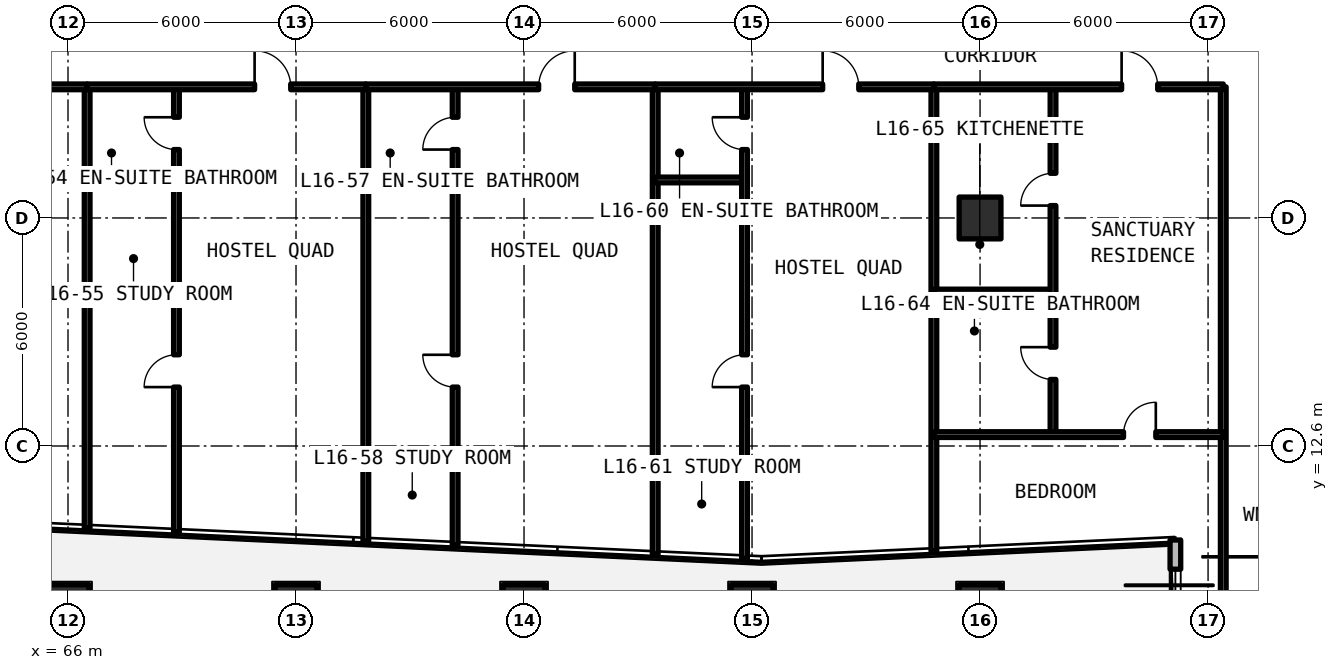
"""IFC4 building model, lengths in metres.
Left out: names, types, materials, properties, quantities, classifications, styles, units other than length and angle.
Written with IfcOpenShell. Run it as: python <this file> out.ifc"""

import sys

from ifc_helpers import new_model, si_unit, direction, frame, frame_2d, origin, origin_2d, place, context, subcontext, project, spatial, rectangle, extrude, element, fill, save


model = new_model("IFC4")
c1 = context("Model", 3, precision=1e-05, world=origin(), true_north=direction((0.0, 1.0)))
c2 = subcontext(c1, "Body", "Model", "MODEL_VIEW")
j1 = project(units=[si_unit("LENGTHUNIT", "METRE"), si_unit("PLANEANGLEUNIT", "RADIAN")], contexts=[c1])
p1 = place(None, origin())
s1 = spatial("IfcSite", under=j1, at=p1, CompositionType="ELEMENT")
p2 = place(p1, origin())
s2 = spatial("IfcBuilding", under=s1, at=p2, CompositionType="ELEMENT")
p3 = place(p2, frame((0.0, 0.0, 58.74)))
s3 = spatial("IfcBuildingStorey", under=s2, at=p3, CompositionType="ELEMENT", Elevation=58.74)
for number, where, z_axis, x_axis in (
    (1, (90.0, 18.6, 0.0), (0.0, 0.0, 1.0), (1.0, 0.0, 0.0)),
    (2, (66.0, 8.4, 0.0), (0.0, 0.0, 1.0), (1.0, 0.0, 0.0)),
    (3, (72.0, 8.4, 0.0), (0.0, 0.0, 1.0), (1.0, 0.0, 0.0)),
    (4, (78.0, 8.4, 0.0), (0.0, 0.0, 1.0), (1.0, 0.0, 0.0)),
    (5, (84.0, 8.4, 0.0), (0.0, 0.0, 1.0), (1.0, 0.0, 0.0)),
    (6, (90.0, 8.4, 0.0), (0.0, 0.0, 1.0), (1.0, 0.0, 0.0)),
):
    element("IfcColumn", number, at=place(p3, frame(where, z_axis=z_axis, x_axis=x_axis)), inside=s3, PredefinedType="COLUMN", context=c2, shape_type="SweptSolid", body=[
        extrude(rectangle(XDim=1.1, YDim=1.1, at=origin_2d()), origin(), (0.0, 0.0, 1.0), 3.63),
    ])
p4 = place(p3, frame((95.14, 10.127, 0.0), z_axis=(0.0, 0.0, 1.0), x_axis=(0.0, -1.0, 0.0)))
e7 = element("IfcWall", 7, at=p4, inside=s3, PredefinedType="SOLIDWALL", context=c2, shape_type="SweptSolid", body=[
    extrude(rectangle(XDim=2.387, YDim=0.28, at=frame_2d((1.193, 0.0))), origin(), (0.0, 0.0, 1.0), 3.41),
])
p5 = place(p4, frame((0.768, 0.0, 0.78)))
e8 = element("IfcOpeningElement", 8, at=p5, cuts=e7, PredefinedType="OPENING", context=c2, shape_type="SweptSolid", body=[
    extrude(rectangle(XDim=0.85, YDim=1.65, at=frame_2d((0.425, 0.825))), frame((0.0, 0.15, 0.0), z_axis=(0.0, -1.0, 0.0), x_axis=(1.0, 0.0, 0.0)), (0.0, 0.0, 1.0), 0.3),
])
p6 = place(p3, frame((96.542, 7.74, 0.0), z_axis=(0.0, 0.0, 1.0), x_axis=(0.707106781187, 0.707106781187, 0.0)))
e9 = element("IfcWall", 9, at=p6, inside=s3, PredefinedType="SOLIDWALL", context=c2, shape_type="SweptSolid", body=[
    extrude(rectangle(XDim=5.824, YDim=0.28, at=frame_2d((2.912, 0.0))), origin(), (0.0, 0.0, 1.0), 3.41),
])
p7 = place(p6, frame((1.212, 0.0, 0.78)))
e10 = element("IfcOpeningElement", 10, at=p7, cuts=e9, PredefinedType="OPENING", context=c2, shape_type="SweptSolid", body=[
    extrude(rectangle(XDim=3.4, YDim=1.66, at=frame_2d((1.7, 0.83))), frame((0.0, 0.15, 0.0), z_axis=(0.0, -1.0, 0.0), x_axis=(1.0, 0.0, 0.0)), (0.0, 0.0, 1.0), 0.3),
])
p8 = place(p3, frame((96.4, 7.74, 0.0), z_axis=(0.0, 0.0, 1.0), x_axis=(0.0, 1.0, 0.0)))
e11 = element("IfcWall", 11, at=p8, inside=s3, PredefinedType="SOLIDWALL", context=c2, shape_type="SweptSolid", body=[
    extrude(rectangle(XDim=14.31, YDim=0.15, at=frame_2d((7.155, 0.0))), origin(), (0.0, 0.0, 1.0), 2.63),
])
p9 = place(p3, frame((66.504, 10.446, 0.0), z_axis=(0.0, 0.0, 1.0), x_axis=(0.0, 1.0, 0.0)))
e12 = element("IfcWall", 12, at=p9, inside=s3, PredefinedType="SOLIDWALL", context=c2, shape_type="SweptSolid", body=[
    extrude(rectangle(XDim=11.604, YDim=0.15, at=frame_2d((5.802, 0.0))), origin(), (0.0, 0.0, 1.0), 2.63),
])
p10 = place(p3, frame((58.889, 22.05, 0.0), z_axis=(0.0, 0.0, 1.0), x_axis=(1.0, 0.0, 0.0)))
e13 = element("IfcWall", 13, at=p10, inside=s3, PredefinedType="SOLIDWALL", context=c2, shape_type="SweptSolid", body=[
    extrude(rectangle(XDim=7.615, YDim=0.15, at=frame_2d((3.808, 0.0))), origin(), (0.0, 0.0, 1.0), 2.63),
])
p11 = place(p10, frame((4.548, 0.0, 0.0)))
e14 = element("IfcOpeningElement", 14, at=p11, cuts=e13, PredefinedType="OPENING", context=c2, shape_type="SweptSolid", body=[
    extrude(rectangle(XDim=0.95, YDim=2.15, at=frame_2d((0.475, 1.075))), frame((0.0, 0.085, 0.0), z_axis=(0.0, -1.0, 0.0), x_axis=(1.0, 0.0, 0.0)), (0.0, 0.0, 1.0), 0.17),
])
p12 = place(p3, frame((73.837, 10.104, 0.0), z_axis=(0.0, 0.0, 1.0), x_axis=(0.0, 1.0, 0.0)))
e15 = element("IfcWall", 15, at=p12, inside=s3, PredefinedType="SOLIDWALL", context=c2, shape_type="SweptSolid", body=[
    extrude(rectangle(XDim=11.946, YDim=0.15, at=frame_2d((5.973, 0.0))), origin(), (0.0, 0.0, 1.0), 2.63),
])
p13 = place(p3, frame((66.504, 19.6, 0.0), z_axis=(0.0, 0.0, 1.0), x_axis=(1.0, 0.0, 0.0)))
e16 = element("IfcWall", 16, at=p13, inside=s3, PredefinedType="PARTITIONING", context=c2, shape_type="SweptSolid", body=[
    extrude(rectangle(XDim=2.35, YDim=0.15, at=frame_2d((1.175, 0.0))), origin(), (0.0, 0.0, 1.0), 2.63),
])
p14 = place(p3, frame((68.854, 10.336, 0.0), z_axis=(0.0, 0.0, 1.0), x_axis=(0.0, 1.0, 0.0)))
e17 = element("IfcWall", 17, at=p14, inside=s3, PredefinedType="PARTITIONING", context=c2, shape_type="SweptSolid", body=[
    extrude(rectangle(XDim=11.714, YDim=0.15, at=frame_2d((5.857, 0.0))), origin(), (0.0, 0.0, 1.0), 2.63),
])
p15 = place(p14, frame((3.814, 0.0, 0.0)))
e18 = element("IfcOpeningElement", 18, at=p15, cuts=e17, PredefinedType="OPENING", context=c2, shape_type="SweptSolid", body=[
    extrude(rectangle(XDim=0.85, YDim=2.1, at=frame_2d((0.425, 1.05))), frame((0.0, 0.085, 0.0), z_axis=(0.0, -1.0, 0.0), x_axis=(1.0, 0.0, 0.0)), (0.0, 0.0, 1.0), 0.17),
])
p16 = place(p14, frame((10.064, 0.0, 0.0)))
e19 = element("IfcOpeningElement", 19, at=p16, cuts=e17, PredefinedType="OPENING", context=c2, shape_type="SweptSolid", body=[
    extrude(rectangle(XDim=0.85, YDim=2.1, at=frame_2d((0.425, 1.05))), frame((0.0, 0.085, 0.0), z_axis=(0.0, -1.0, 0.0), x_axis=(1.0, 0.0, 0.0)), (0.0, 0.0, 1.0), 0.17),
])
p17 = place(p3, frame((66.504, 22.05, 0.0), z_axis=(0.0, 0.0, 1.0), x_axis=(1.0, 0.0, 0.0)))
e20 = element("IfcWall", 20, at=p17, inside=s3, PredefinedType="SOLIDWALL", context=c2, shape_type="SweptSolid", body=[
    extrude(rectangle(XDim=7.333, YDim=0.15, at=frame_2d((3.667, 0.0))), origin(), (0.0, 0.0, 1.0), 2.63),
])
p18 = place(p17, frame((4.406, 0.0, 0.0)))
e21 = element("IfcOpeningElement", 21, at=p18, cuts=e20, PredefinedType="OPENING", context=c2, shape_type="SweptSolid", body=[
    extrude(rectangle(XDim=0.95, YDim=2.15, at=frame_2d((0.475, 1.075))), frame((0.0, 0.085, 0.0), z_axis=(0.0, -1.0, 0.0), x_axis=(1.0, 0.0, 0.0)), (0.0, 0.0, 1.0), 0.17),
])
p19 = place(p3, frame((81.452, 9.75, 0.0), z_axis=(0.0, 0.0, 1.0), x_axis=(0.0, 1.0, 0.0)))
e22 = element("IfcWall", 22, at=p19, inside=s3, PredefinedType="SOLIDWALL", context=c2, shape_type="SweptSolid", body=[
    extrude(rectangle(XDim=12.3, YDim=0.15, at=frame_2d((6.15, 0.0))), origin(), (0.0, 0.0, 1.0), 2.63),
])
p20 = place(p3, frame((73.837, 19.6, 0.0), z_axis=(0.0, 0.0, 1.0), x_axis=(1.0, 0.0, 0.0)))
e23 = element("IfcWall", 23, at=p20, inside=s3, PredefinedType="PARTITIONING", context=c2, shape_type="SweptSolid", body=[
    extrude(rectangle(XDim=2.35, YDim=0.15, at=frame_2d((1.175, 0.0))), origin(), (0.0, 0.0, 1.0), 2.63),
])
p21 = place(p3, frame((76.187, 9.995, 0.0), z_axis=(0.0, 0.0, 1.0), x_axis=(0.0, 1.0, 0.0)))
e24 = element("IfcWall", 24, at=p21, inside=s3, PredefinedType="PARTITIONING", context=c2, shape_type="SweptSolid", body=[
    extrude(rectangle(XDim=12.055, YDim=0.15, at=frame_2d((6.027, 0.0))), origin(), (0.0, 0.0, 1.0), 2.63),
])
p22 = place(p21, frame((4.155, 0.0, 0.0)))
e25 = element("IfcOpeningElement", 25, at=p22, cuts=e24, PredefinedType="OPENING", context=c2, shape_type="SweptSolid", body=[
    extrude(rectangle(XDim=0.85, YDim=2.1, at=frame_2d((0.425, 1.05))), frame((0.0, 0.085, 0.0), z_axis=(0.0, -1.0, 0.0), x_axis=(1.0, 0.0, 0.0)), (0.0, 0.0, 1.0), 0.17),
])
p23 = place(p21, frame((10.405, 0.0, 0.0)))
e26 = element("IfcOpeningElement", 26, at=p23, cuts=e24, PredefinedType="OPENING", context=c2, shape_type="SweptSolid", body=[
    extrude(rectangle(XDim=0.85, YDim=2.1, at=frame_2d((0.425, 1.05))), frame((0.0, 0.085, 0.0), z_axis=(0.0, -1.0, 0.0), x_axis=(1.0, 0.0, 0.0)), (0.0, 0.0, 1.0), 0.17),
])
p24 = place(p3, frame((73.837, 22.05, 0.0), z_axis=(0.0, 0.0, 1.0), x_axis=(1.0, 0.0, 0.0)))
e27 = element("IfcWall", 27, at=p24, inside=s3, PredefinedType="SOLIDWALL", context=c2, shape_type="SweptSolid", body=[
    extrude(rectangle(XDim=7.615, YDim=0.15, at=frame_2d((3.808, 0.0))), origin(), (0.0, 0.0, 1.0), 2.63),
])
p25 = place(p24, frame((4.548, 0.0, 0.0)))
e28 = element("IfcOpeningElement", 28, at=p25, cuts=e27, PredefinedType="OPENING", context=c2, shape_type="SweptSolid", body=[
    extrude(rectangle(XDim=0.95, YDim=2.15, at=frame_2d((0.475, 1.075))), frame((0.0, 0.085, 0.0), z_axis=(0.0, -1.0, 0.0), x_axis=(1.0, 0.0, 0.0)), (0.0, 0.0, 1.0), 0.17),
])
p26 = place(p3, frame((88.785, 9.831, 0.0), z_axis=(0.0, 0.0, 1.0), x_axis=(0.0, 1.0, 0.0)))
e29 = element("IfcWall", 29, at=p26, inside=s3, PredefinedType="SOLIDWALL", context=c2, shape_type="SweptSolid", body=[
    extrude(rectangle(XDim=12.219, YDim=0.15, at=frame_2d((6.109, 0.0))), origin(), (0.0, 0.0, 1.0), 2.63),
])
p27 = place(p3, frame((81.452, 19.6, 0.0), z_axis=(0.0, 0.0, 1.0), x_axis=(1.0, 0.0, 0.0)))
e30 = element("IfcWall", 30, at=p27, inside=s3, PredefinedType="PARTITIONING", context=c2, shape_type="SweptSolid", body=[
    extrude(rectangle(XDim=2.35, YDim=0.15, at=frame_2d((1.175, 0.0))), origin(), (0.0, 0.0, 1.0), 2.63),
])
p28 = place(p3, frame((83.802, 9.641, 0.0), z_axis=(0.0, 0.0, 1.0), x_axis=(0.0, 1.0, 0.0)))
e31 = element("IfcWall", 31, at=p28, inside=s3, PredefinedType="PARTITIONING", context=c2, shape_type="SweptSolid", body=[
    extrude(rectangle(XDim=12.409, YDim=0.15, at=frame_2d((6.205, 0.0))), origin(), (0.0, 0.0, 1.0), 2.63),
])
p29 = place(p28, frame((4.509, 0.0, 0.0)))
e32 = element("IfcOpeningElement", 32, at=p29, cuts=e31, PredefinedType="OPENING", context=c2, shape_type="SweptSolid", body=[
    extrude(rectangle(XDim=0.85, YDim=2.1, at=frame_2d((0.425, 1.05))), frame((0.0, 0.085, 0.0), z_axis=(0.0, -1.0, 0.0), x_axis=(1.0, 0.0, 0.0)), (0.0, 0.0, 1.0), 0.17),
])
p30 = place(p28, frame((10.759, 0.0, 0.0)))
e33 = element("IfcOpeningElement", 33, at=p30, cuts=e31, PredefinedType="OPENING", context=c2, shape_type="SweptSolid", body=[
    extrude(rectangle(XDim=0.85, YDim=2.1, at=frame_2d((0.425, 1.05))), frame((0.0, 0.085, 0.0), z_axis=(0.0, -1.0, 0.0), x_axis=(1.0, 0.0, 0.0)), (0.0, 0.0, 1.0), 0.17),
])
p31 = place(p3, frame((81.452, 22.05, 0.0), z_axis=(0.0, 0.0, 1.0), x_axis=(1.0, 0.0, 0.0)))
e34 = element("IfcWall", 34, at=p31, inside=s3, PredefinedType="SOLIDWALL", context=c2, shape_type="SweptSolid", body=[
    extrude(rectangle(XDim=7.333, YDim=0.15, at=frame_2d((3.667, 0.0))), origin(), (0.0, 0.0, 1.0), 2.63),
])
p32 = place(p31, frame((4.406, 0.0, 0.0)))
e35 = element("IfcOpeningElement", 35, at=p32, cuts=e34, PredefinedType="OPENING", context=c2, shape_type="SweptSolid", body=[
    extrude(rectangle(XDim=0.95, YDim=2.15, at=frame_2d((0.475, 1.075))), frame((0.0, 0.085, 0.0), z_axis=(0.0, -1.0, 0.0), x_axis=(1.0, 0.0, 0.0)), (0.0, 0.0, 1.0), 0.17),
])
p33 = place(p3, frame((88.785, 16.652, 0.0), z_axis=(0.0, 0.0, 1.0), x_axis=(1.0, 0.0, 0.0)))
e36 = element("IfcWall", 36, at=p33, inside=s3, PredefinedType="PARTITIONING", context=c2, shape_type="SweptSolid", body=[
    extrude(rectangle(XDim=3.135, YDim=0.15, at=frame_2d((1.567, 0.0))), origin(), (0.0, 0.0, 1.0), 2.63),
])
p34 = place(p3, frame((91.92, 12.9, 0.0), z_axis=(0.0, 0.0, 1.0), x_axis=(0.0, 1.0, 0.0)))
e37 = element("IfcWall", 37, at=p34, inside=s3, PredefinedType="PARTITIONING", context=c2, shape_type="SweptSolid", body=[
    extrude(rectangle(XDim=9.15, YDim=0.15, at=frame_2d((4.575, 0.0))), origin(), (0.0, 0.0, 1.0), 2.63),
])
p35 = place(p34, frame((1.451, 0.0, 0.0)))
e38 = element("IfcOpeningElement", 38, at=p35, cuts=e37, PredefinedType="OPENING", context=c2, shape_type="SweptSolid", body=[
    extrude(rectangle(XDim=0.85, YDim=2.1, at=frame_2d((0.425, 1.05))), frame((0.0, 0.085, 0.0), z_axis=(0.0, -1.0, 0.0), x_axis=(1.0, 0.0, 0.0)), (0.0, 0.0, 1.0), 0.17),
])
p36 = place(p34, frame((6.026, 0.0, 0.0)))
e39 = element("IfcOpeningElement", 39, at=p36, cuts=e37, PredefinedType="OPENING", context=c2, shape_type="SweptSolid", body=[
    extrude(rectangle(XDim=0.85, YDim=2.1, at=frame_2d((0.425, 1.05))), frame((0.0, 0.085, 0.0), z_axis=(0.0, -1.0, 0.0), x_axis=(1.0, 0.0, 0.0)), (0.0, 0.0, 1.0), 0.17),
])
p37 = place(p3, frame((88.785, 12.9, 0.0), z_axis=(0.0, 0.0, 1.0), x_axis=(1.0, 0.0, 0.0)))
e40 = element("IfcWall", 40, at=p37, inside=s3, PredefinedType="PARTITIONING", context=c2, shape_type="SweptSolid", body=[
    extrude(rectangle(XDim=7.615, YDim=0.15, at=frame_2d((3.808, 0.0))), origin(), (0.0, 0.0, 1.0), 2.63),
])
p38 = place(p37, frame((4.99, 0.0, 0.0)))
e41 = element("IfcOpeningElement", 41, at=p38, cuts=e40, PredefinedType="OPENING", context=c2, shape_type="SweptSolid", body=[
    extrude(rectangle(XDim=0.85, YDim=2.1, at=frame_2d((0.425, 1.05))), frame((0.0, 0.085, 0.0), z_axis=(0.0, -1.0, 0.0), x_axis=(1.0, 0.0, 0.0)), (0.0, 0.0, 1.0), 0.17),
])
p39 = place(p3, frame((88.785, 22.05, 0.0), z_axis=(0.0, 0.0, 1.0), x_axis=(1.0, 0.0, 0.0)))
e42 = element("IfcWall", 42, at=p39, inside=s3, PredefinedType="SOLIDWALL", context=c2, shape_type="SweptSolid", body=[
    extrude(rectangle(XDim=7.615, YDim=0.15, at=frame_2d((3.808, 0.0))), origin(), (0.0, 0.0, 1.0), 2.63),
])
p40 = place(p39, frame((4.94, 0.0, 0.0)))
e43 = element("IfcOpeningElement", 43, at=p40, cuts=e42, PredefinedType="OPENING", context=c2, shape_type="SweptSolid", body=[
    extrude(rectangle(XDim=0.95, YDim=2.15, at=frame_2d((0.475, 1.075))), frame((0.0, 0.085, 0.0), z_axis=(0.0, -1.0, 0.0), x_axis=(1.0, 0.0, 0.0)), (0.0, 0.0, 1.0), 0.17),
])
p41 = place(p5, origin())
e44 = element("IfcWindow", 44, at=p41, inside=s3, PartitioningType="SINGLE_PANEL", PredefinedType="WINDOW", context=c2, shape_type="SweptSolid", body=[
    extrude(rectangle(XDim=0.85, YDim=1.65, at=frame_2d((0.425, 0.825))), frame((0.0, 0.03, 0.0), z_axis=(0.0, -1.0, 0.0), x_axis=(1.0, 0.0, 0.0)), (0.0, 0.0, 1.0), 0.06),
])
fill(e8, e44)
p42 = place(p15, origin())
e45 = element("IfcDoor", 45, at=p42, inside=s3, OperationType="SINGLE_SWING_LEFT", PredefinedType="DOOR", context=c2, shape_type="SweptSolid", body=[
    extrude(rectangle(XDim=0.85, YDim=2.1, at=frame_2d((0.425, 1.05))), frame((0.0, 0.025, 0.0), z_axis=(0.0, -1.0, 0.0), x_axis=(1.0, 0.0, 0.0)), (0.0, 0.0, 1.0), 0.05),
])
fill(e18, e45)
p43 = place(p16, origin())
e46 = element("IfcDoor", 46, at=p43, inside=s3, OperationType="SINGLE_SWING_RIGHT", PredefinedType="DOOR", context=c2, shape_type="SweptSolid", body=[
    extrude(rectangle(XDim=0.85, YDim=2.1, at=frame_2d((0.425, 1.05))), frame((0.0, 0.025, 0.0), z_axis=(0.0, -1.0, 0.0), x_axis=(1.0, 0.0, 0.0)), (0.0, 0.0, 1.0), 0.05),
])
fill(e19, e46)
p44 = place(p18, origin())
e47 = element("IfcDoor", 47, at=p44, inside=s3, OperationType="SINGLE_SWING_LEFT", PredefinedType="DOOR", context=c2, shape_type="SweptSolid", body=[
    extrude(rectangle(XDim=0.95, YDim=2.15, at=frame_2d((0.475, 1.075))), frame((0.0, 0.025, 0.0), z_axis=(0.0, -1.0, 0.0), x_axis=(1.0, 0.0, 0.0)), (0.0, 0.0, 1.0), 0.05),
])
fill(e21, e47)
p45 = place(p22, origin())
e48 = element("IfcDoor", 48, at=p45, inside=s3, OperationType="SINGLE_SWING_RIGHT", PredefinedType="DOOR", context=c2, shape_type="SweptSolid", body=[
    extrude(rectangle(XDim=0.85, YDim=2.1, at=frame_2d((0.425, 1.05))), frame((0.0, 0.025, 0.0), z_axis=(0.0, -1.0, 0.0), x_axis=(1.0, 0.0, 0.0)), (0.0, 0.0, 1.0), 0.05),
])
fill(e25, e48)
p46 = place(p23, origin())
e49 = element("IfcDoor", 49, at=p46, inside=s3, OperationType="SINGLE_SWING_LEFT", PredefinedType="DOOR", context=c2, shape_type="SweptSolid", body=[
    extrude(rectangle(XDim=0.85, YDim=2.1, at=frame_2d((0.425, 1.05))), frame((0.0, 0.025, 0.0), z_axis=(0.0, -1.0, 0.0), x_axis=(1.0, 0.0, 0.0)), (0.0, 0.0, 1.0), 0.05),
])
fill(e26, e49)
p47 = place(p25, origin())
e50 = element("IfcDoor", 50, at=p47, inside=s3, OperationType="SINGLE_SWING_RIGHT", PredefinedType="DOOR", context=c2, shape_type="SweptSolid", body=[
    extrude(rectangle(XDim=0.95, YDim=2.15, at=frame_2d((0.475, 1.075))), frame((0.0, 0.025, 0.0), z_axis=(0.0, -1.0, 0.0), x_axis=(1.0, 0.0, 0.0)), (0.0, 0.0, 1.0), 0.05),
])
fill(e28, e50)
p48 = place(p29, origin())
e51 = element("IfcDoor", 51, at=p48, inside=s3, OperationType="SINGLE_SWING_LEFT", PredefinedType="DOOR", context=c2, shape_type="SweptSolid", body=[
    extrude(rectangle(XDim=0.85, YDim=2.1, at=frame_2d((0.425, 1.05))), frame((0.0, 0.025, 0.0), z_axis=(0.0, -1.0, 0.0), x_axis=(1.0, 0.0, 0.0)), (0.0, 0.0, 1.0), 0.05),
])
fill(e32, e51)
p49 = place(p30, origin())
e52 = element("IfcDoor", 52, at=p49, inside=s3, OperationType="SINGLE_SWING_RIGHT", PredefinedType="DOOR", context=c2, shape_type="SweptSolid", body=[
    extrude(rectangle(XDim=0.85, YDim=2.1, at=frame_2d((0.425, 1.05))), frame((0.0, 0.025, 0.0), z_axis=(0.0, -1.0, 0.0), x_axis=(1.0, 0.0, 0.0)), (0.0, 0.0, 1.0), 0.05),
])
fill(e33, e52)
p50 = place(p32, origin())
e53 = element("IfcDoor", 53, at=p50, inside=s3, OperationType="SINGLE_SWING_LEFT", PredefinedType="DOOR", context=c2, shape_type="SweptSolid", body=[
    extrude(rectangle(XDim=0.95, YDim=2.15, at=frame_2d((0.475, 1.075))), frame((0.0, 0.025, 0.0), z_axis=(0.0, -1.0, 0.0), x_axis=(1.0, 0.0, 0.0)), (0.0, 0.0, 1.0), 0.05),
])
fill(e35, e53)
p51 = place(p35, origin())
e54 = element("IfcDoor", 54, at=p51, inside=s3, OperationType="SINGLE_SWING_RIGHT", PredefinedType="DOOR", context=c2, shape_type="SweptSolid", body=[
    extrude(rectangle(XDim=0.85, YDim=2.1, at=frame_2d((0.425, 1.05))), frame((0.0, 0.025, 0.0), z_axis=(0.0, -1.0, 0.0), x_axis=(1.0, 0.0, 0.0)), (0.0, 0.0, 1.0), 0.05),
])
fill(e38, e54)
p52 = place(p36, origin())
e55 = element("IfcDoor", 55, at=p52, inside=s3, OperationType="SINGLE_SWING_LEFT", PredefinedType="DOOR", context=c2, shape_type="SweptSolid", body=[
    extrude(rectangle(XDim=0.85, YDim=2.1, at=frame_2d((0.425, 1.05))), frame((0.0, 0.025, 0.0), z_axis=(0.0, -1.0, 0.0), x_axis=(1.0, 0.0, 0.0)), (0.0, 0.0, 1.0), 0.05),
])
fill(e39, e55)
p53 = place(p38, origin())
e56 = element("IfcDoor", 56, at=p53, inside=s3, OperationType="SINGLE_SWING_RIGHT", PredefinedType="DOOR", context=c2, shape_type="SweptSolid", body=[
    extrude(rectangle(XDim=0.85, YDim=2.1, at=frame_2d((0.425, 1.05))), frame((0.0, 0.025, 0.0), z_axis=(0.0, -1.0, 0.0), x_axis=(1.0, 0.0, 0.0)), (0.0, 0.0, 1.0), 0.05),
])
fill(e41, e56)
p54 = place(p40, origin())
e57 = element("IfcDoor", 57, at=p54, inside=s3, OperationType="SINGLE_SWING_LEFT", PredefinedType="DOOR", context=c2, shape_type="SweptSolid", body=[
    extrude(rectangle(XDim=0.95, YDim=2.15, at=frame_2d((0.475, 1.075))), frame((0.0, 0.025, 0.0), z_axis=(0.0, -1.0, 0.0), x_axis=(1.0, 0.0, 0.0)), (0.0, 0.0, 1.0), 0.05),
])
fill(e43, e57)
save(model, sys.argv[1])
